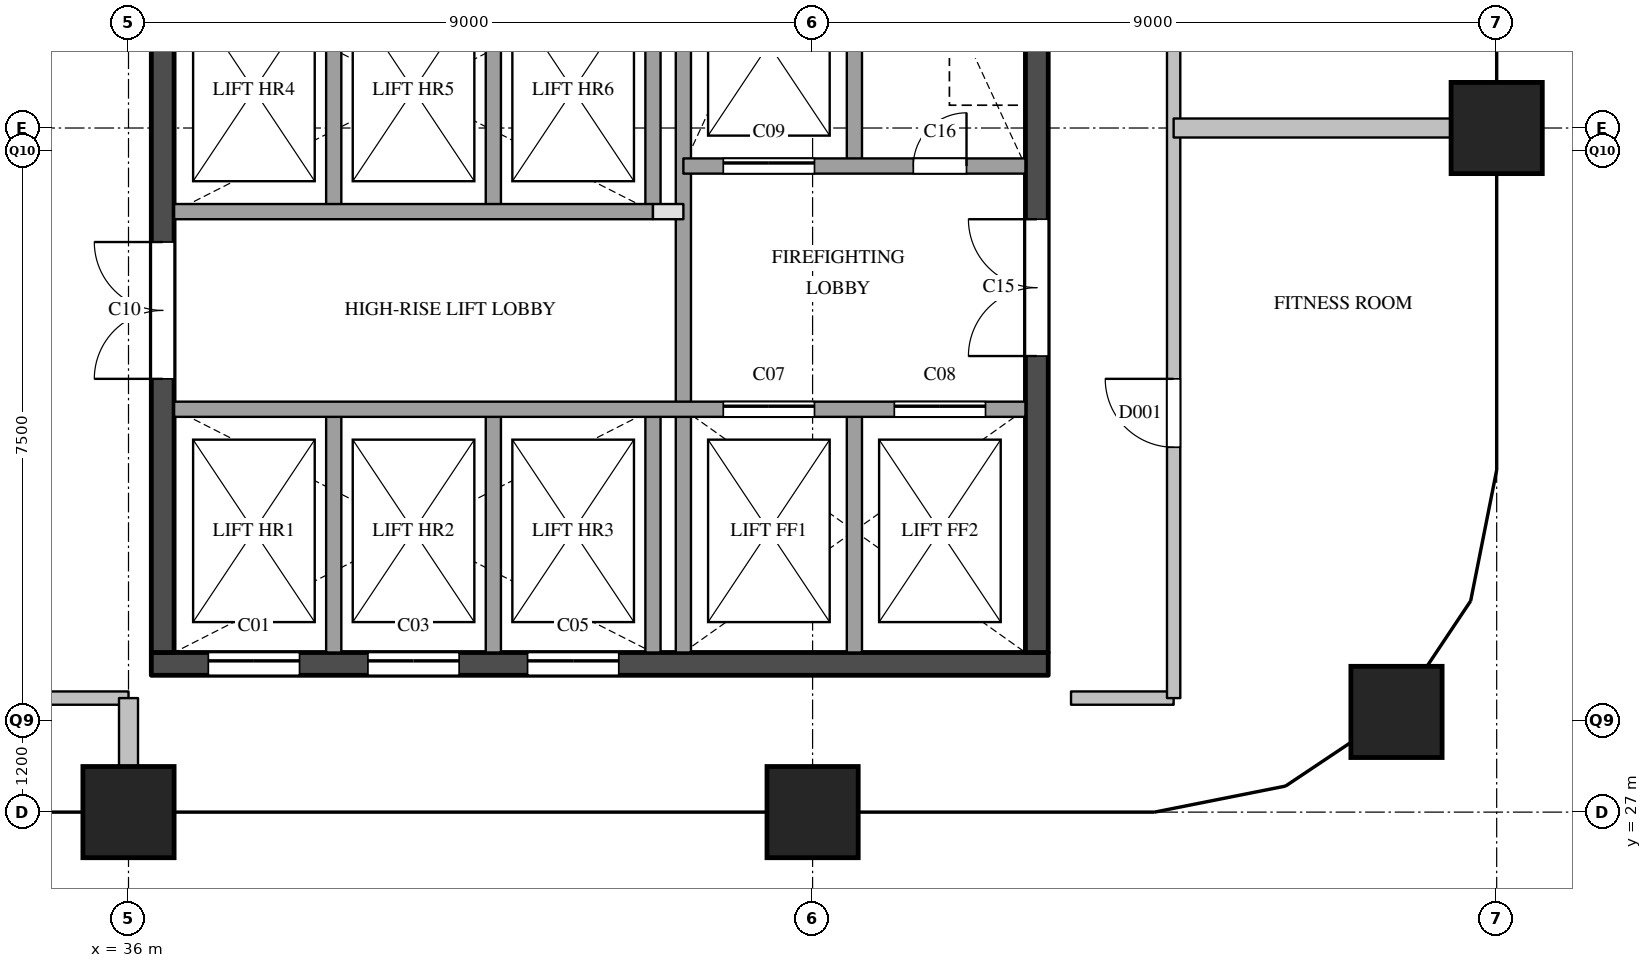
"""IFC4 building model, lengths in metres.
Left out: names, types, materials, properties, quantities, classifications, styles, units other than length and angle.
Written with IfcOpenShell. Run it as: python <this file> out.ifc"""

import sys

from ifc_helpers import new_model, si_unit, direction, frame, frame_2d, origin, origin_2d, place, context, subcontext, project, spatial, rectangle, extrude, element, fill, save


model = new_model("IFC4")
c1 = context("Model", 3, precision=1e-05, world=origin(), true_north=direction((0.0, 1.0)))
c2 = subcontext(c1, "Body", "Model", "MODEL_VIEW")
j1 = project(units=[si_unit("LENGTHUNIT", "METRE"), si_unit("PLANEANGLEUNIT", "RADIAN")], contexts=[c1])
p1 = place(None, origin())
s1 = spatial("IfcSite", under=j1, at=p1, CompositionType="ELEMENT")
p2 = place(p1, origin())
s2 = spatial("IfcBuilding", under=s1, at=p2, CompositionType="ELEMENT")
p3 = place(p2, frame((0.0, 0.0, 290.2)))
s3 = spatial("IfcBuildingStorey", under=s2, at=p3, CompositionType="ELEMENT", Elevation=290.2)
for number, where, z_axis, x_axis in (
    (1, (36.0, 27.0, 0.0), (0.0, 0.0, 1.0), (1.0, 0.0, 0.0)),
    (2, (45.0, 27.0, 0.0), (0.0, 0.0, 1.0), (1.0, 0.0, 0.0)),
    (3, (52.682, 28.318, 0.0), (0.0, 0.0, 1.0), (1.0, 0.0, 0.0)),
    (4, (54.0, 36.0, 0.0), (0.0, 0.0, 1.0), (1.0, 0.0, 0.0)),
):
    element("IfcColumn", number, at=place(p3, frame(where, z_axis=z_axis, x_axis=x_axis)), inside=s3, PredefinedType="COLUMN", context=c2, shape_type="SweptSolid", body=[
        extrude(rectangle(XDim=1.2, YDim=1.2, at=origin_2d()), origin(), (0.0, 0.0, 1.0), 5.0),
    ])
p4 = place(p3, frame((36.3, 28.95, 0.0), z_axis=(0.0, 0.0, 1.0), x_axis=(1.0, 0.0, 0.0)))
e5 = element("IfcWall", 5, at=p4, inside=s3, PredefinedType="SHEAR", context=c2, shape_type="SweptSolid", body=[
    extrude(rectangle(XDim=11.8, YDim=0.3, at=frame_2d((5.9, 0.0))), origin(), (0.0, 0.0, 1.0), 4.5),
])
p5 = place(p4, frame((0.75, 0.0, 0.0)))
e6 = element("IfcOpeningElement", 6, at=p5, cuts=e5, PredefinedType="OPENING", context=c2, shape_type="SweptSolid", body=[
    extrude(rectangle(XDim=1.2, YDim=2.1, at=frame_2d((0.6, 1.05))), frame((0.0, 0.16, 0.0), z_axis=(0.0, -1.0, 0.0), x_axis=(1.0, 0.0, 0.0)), (0.0, 0.0, 1.0), 0.32),
])
p6 = place(p4, frame((2.85, 0.0, 0.0)))
e7 = element("IfcOpeningElement", 7, at=p6, cuts=e5, PredefinedType="OPENING", context=c2, shape_type="SweptSolid", body=[
    extrude(rectangle(XDim=1.2, YDim=2.1, at=frame_2d((0.6, 1.05))), frame((0.0, 0.16, 0.0), z_axis=(0.0, -1.0, 0.0), x_axis=(1.0, 0.0, 0.0)), (0.0, 0.0, 1.0), 0.32),
])
p7 = place(p4, frame((4.95, 0.0, 0.0)))
e8 = element("IfcOpeningElement", 8, at=p7, cuts=e5, PredefinedType="OPENING", context=c2, shape_type="SweptSolid", body=[
    extrude(rectangle(XDim=1.2, YDim=2.1, at=frame_2d((0.6, 1.05))), frame((0.0, 0.16, 0.0), z_axis=(0.0, -1.0, 0.0), x_axis=(1.0, 0.0, 0.0)), (0.0, 0.0, 1.0), 0.32),
])
p8 = place(p3, frame((36.45, 29.1, 0.0), z_axis=(0.0, 0.0, 1.0), x_axis=(0.0, 1.0, 0.0)))
e9 = element("IfcWall", 9, at=p8, inside=s3, PredefinedType="SHEAR", context=c2, shape_type="SweptSolid", body=[
    extrude(rectangle(XDim=20.3, YDim=0.3, at=frame_2d((10.15, 0.0))), origin(), (0.0, 0.0, 1.0), 4.5),
])
p9 = place(p8, frame((3.6, 0.0, 0.0)))
e10 = element("IfcOpeningElement", 10, at=p9, cuts=e9, PredefinedType="OPENING", context=c2, shape_type="SweptSolid", body=[
    extrude(rectangle(XDim=1.8, YDim=2.1, at=frame_2d((0.9, 1.05))), frame((0.0, 0.16, 0.0), z_axis=(0.0, -1.0, 0.0), x_axis=(1.0, 0.0, 0.0)), (0.0, 0.0, 1.0), 0.32),
])
p10 = place(p8, frame((16.4, 0.0, 0.0)))
e11 = element("IfcOpeningElement", 11, at=p10, cuts=e9, PredefinedType="OPENING", context=c2, shape_type="SweptSolid", body=[
    extrude(rectangle(XDim=1.0, YDim=2.1, at=frame_2d((0.5, 1.05))), frame((0.0, 0.16, 0.0), z_axis=(0.0, -1.0, 0.0), x_axis=(1.0, 0.0, 0.0)), (0.0, 0.0, 1.0), 0.32),
])
p11 = place(p3, frame((47.95, 29.1, 0.0), z_axis=(0.0, 0.0, 1.0), x_axis=(0.0, 1.0, 0.0)))
e12 = element("IfcWall", 12, at=p11, inside=s3, PredefinedType="SHEAR", context=c2, shape_type="SweptSolid", body=[
    extrude(rectangle(XDim=20.3, YDim=0.3, at=frame_2d((10.15, 0.0))), origin(), (0.0, 0.0, 1.0), 4.5),
])
p12 = place(p11, frame((12.5, 0.0, 0.0)))
e13 = element("IfcOpeningElement", 13, at=p12, cuts=e12, PredefinedType="OPENING", context=c2, shape_type="SweptSolid", body=[
    extrude(rectangle(XDim=0.7, YDim=2.1, at=frame_2d((0.35, 1.05))), frame((0.0, 0.16, 0.0), z_axis=(0.0, -1.0, 0.0), x_axis=(1.0, 0.0, 0.0)), (0.0, 0.0, 1.0), 0.32),
])
p13 = place(p11, frame((3.9, 0.0, 0.0)))
e14 = element("IfcOpeningElement", 14, at=p13, cuts=e12, PredefinedType="OPENING", context=c2, shape_type="SweptSolid", body=[
    extrude(rectangle(XDim=1.8, YDim=2.1, at=frame_2d((0.9, 1.05))), frame((0.0, 0.16, 0.0), z_axis=(0.0, -1.0, 0.0), x_axis=(1.0, 0.0, 0.0)), (0.0, 0.0, 1.0), 0.32),
])
p14 = place(p3, frame((38.7, 29.1, 0.0), z_axis=(0.0, 0.0, 1.0), x_axis=(0.0, 1.0, 0.0)))
e15 = element("IfcWall", 15, at=p14, inside=s3, PredefinedType="SOLIDWALL", context=c2, shape_type="SweptSolid", body=[
    extrude(rectangle(XDim=3.2, YDim=0.2, at=frame_2d((1.6, 0.0))), origin(), (0.0, 0.0, 1.0), 4.5),
])
p15 = place(p3, frame((38.7, 34.9, 0.0), z_axis=(0.0, 0.0, 1.0), x_axis=(0.0, 1.0, 0.0)))
e16 = element("IfcWall", 16, at=p15, inside=s3, PredefinedType="SOLIDWALL", context=c2, shape_type="SweptSolid", body=[
    extrude(rectangle(XDim=3.2, YDim=0.2, at=frame_2d((1.6, 0.0))), origin(), (0.0, 0.0, 1.0), 4.5),
])
p16 = place(p3, frame((40.8, 29.1, 0.0), z_axis=(0.0, 0.0, 1.0), x_axis=(0.0, 1.0, 0.0)))
e17 = element("IfcWall", 17, at=p16, inside=s3, PredefinedType="SOLIDWALL", context=c2, shape_type="SweptSolid", body=[
    extrude(rectangle(XDim=3.2, YDim=0.2, at=frame_2d((1.6, 0.0))), origin(), (0.0, 0.0, 1.0), 4.5),
])
p17 = place(p3, frame((40.8, 34.9, 0.0), z_axis=(0.0, 0.0, 1.0), x_axis=(0.0, 1.0, 0.0)))
e18 = element("IfcWall", 18, at=p17, inside=s3, PredefinedType="SOLIDWALL", context=c2, shape_type="SweptSolid", body=[
    extrude(rectangle(XDim=3.2, YDim=0.2, at=frame_2d((1.6, 0.0))), origin(), (0.0, 0.0, 1.0), 4.5),
])
p18 = place(p3, frame((42.9, 29.1, 0.0), z_axis=(0.0, 0.0, 1.0), x_axis=(0.0, 1.0, 0.0)))
e19 = element("IfcWall", 19, at=p18, inside=s3, PredefinedType="SOLIDWALL", context=c2, shape_type="SweptSolid", body=[
    extrude(rectangle(XDim=3.2, YDim=0.2, at=frame_2d((1.6, 0.0))), origin(), (0.0, 0.0, 1.0), 4.5),
])
p19 = place(p3, frame((42.9, 34.9, 0.0), z_axis=(0.0, 0.0, 1.0), x_axis=(0.0, 1.0, 0.0)))
e20 = element("IfcWall", 20, at=p19, inside=s3, PredefinedType="SOLIDWALL", context=c2, shape_type="SweptSolid", body=[
    extrude(rectangle(XDim=3.2, YDim=0.2, at=frame_2d((1.6, 0.0))), origin(), (0.0, 0.0, 1.0), 4.5),
])
p20 = place(p3, frame((43.3, 29.1, 0.0), z_axis=(0.0, 0.0, 1.0), x_axis=(0.0, 1.0, 0.0)))
e21 = element("IfcWall", 21, at=p20, inside=s3, PredefinedType="SOLIDWALL", context=c2, shape_type="SweptSolid", body=[
    extrude(rectangle(XDim=9.9, YDim=0.2, at=frame_2d((4.95, 0.0))), origin(), (0.0, 0.0, 1.0), 4.5),
])
for number, where, z_axis, x_axis in (
    (22, (45.55, 29.1, 0.0), (0.0, 0.0, 1.0), (0.0, 1.0, 0.0)),
    (23, (45.55, 35.5, 0.0), (0.0, 0.0, 1.0), (0.0, 1.0, 0.0)),
):
    element("IfcWall", number, at=place(p3, frame(where, z_axis=z_axis, x_axis=x_axis)), inside=s3, PredefinedType="SOLIDWALL", context=c2, shape_type="SweptSolid", body=[
        extrude(rectangle(XDim=3.2, YDim=0.2, at=frame_2d((1.6, 0.0))), origin(), (0.0, 0.0, 1.0), 4.5),
    ])
p21 = place(p3, frame((36.6, 32.3, 0.0), z_axis=(0.0, 0.0, 1.0), x_axis=(1.0, 0.0, 0.0)))
e24 = element("IfcWall", 24, at=p21, inside=s3, PredefinedType="SOLIDWALL", context=c2, shape_type="SweptSolid", body=[
    extrude(rectangle(XDim=11.2, YDim=0.2, at=frame_2d((5.6, 0.0))), origin(), (0.0, 0.0, 1.0), 4.5),
])
p22 = place(p21, frame((7.225, 0.0, 0.0)))
e25 = element("IfcOpeningElement", 25, at=p22, cuts=e24, PredefinedType="OPENING", context=c2, shape_type="SweptSolid", body=[
    extrude(rectangle(XDim=1.2, YDim=2.1, at=frame_2d((0.6, 1.05))), frame((0.0, 0.11, 0.0), z_axis=(0.0, -1.0, 0.0), x_axis=(1.0, 0.0, 0.0)), (0.0, 0.0, 1.0), 0.22),
])
p23 = place(p21, frame((9.475, 0.0, 0.0)))
e26 = element("IfcOpeningElement", 26, at=p23, cuts=e24, PredefinedType="OPENING", context=c2, shape_type="SweptSolid", body=[
    extrude(rectangle(XDim=1.2, YDim=2.1, at=frame_2d((0.6, 1.05))), frame((0.0, 0.11, 0.0), z_axis=(0.0, -1.0, 0.0), x_axis=(1.0, 0.0, 0.0)), (0.0, 0.0, 1.0), 0.22),
])
p24 = place(p3, frame((42.9, 34.9, 0.0), z_axis=(0.0, 0.0, 1.0), x_axis=(1.0, 0.0, 0.0)))
e27 = element("IfcWall", 27, at=p24, inside=s3, PredefinedType="PARTITIONING", context=c2, shape_type="SweptSolid", body=[
    extrude(rectangle(XDim=0.4, YDim=0.2, at=frame_2d((0.2, 0.0))), origin(), (0.0, 0.0, 1.0), 4.5),
])
p25 = place(p3, frame((36.6, 34.9, 0.0), z_axis=(0.0, 0.0, 1.0), x_axis=(1.0, 0.0, 0.0)))
e28 = element("IfcWall", 28, at=p25, inside=s3, PredefinedType="SOLIDWALL", context=c2, shape_type="SweptSolid", body=[
    extrude(rectangle(XDim=6.3, YDim=0.2, at=frame_2d((3.15, 0.0))), origin(), (0.0, 0.0, 1.0), 4.5),
])
p26 = place(p3, frame((43.3, 35.5, 0.0), z_axis=(0.0, 0.0, 1.0), x_axis=(1.0, 0.0, 0.0)))
e29 = element("IfcWall", 29, at=p26, inside=s3, PredefinedType="SOLIDWALL", context=c2, shape_type="SweptSolid", body=[
    extrude(rectangle(XDim=4.5, YDim=0.2, at=frame_2d((2.25, 0.0))), origin(), (0.0, 0.0, 1.0), 4.5),
])
p27 = place(p26, frame((0.525, 0.0, 0.0)))
e30 = element("IfcOpeningElement", 30, at=p27, cuts=e29, PredefinedType="OPENING", context=c2, shape_type="SweptSolid", body=[
    extrude(rectangle(XDim=1.2, YDim=2.1, at=frame_2d((0.6, 1.05))), frame((0.0, 0.11, 0.0), z_axis=(0.0, -1.0, 0.0), x_axis=(1.0, 0.0, 0.0)), (0.0, 0.0, 1.0), 0.22),
])
p28 = place(p26, frame((3.025, 0.0, 0.0)))
e31 = element("IfcOpeningElement", 31, at=p28, cuts=e29, PredefinedType="OPENING", context=c2, shape_type="SweptSolid", body=[
    extrude(rectangle(XDim=0.7, YDim=2.1, at=frame_2d((0.35, 1.05))), frame((0.0, 0.11, 0.0), z_axis=(0.0, -1.0, 0.0), x_axis=(1.0, 0.0, 0.0)), (0.0, 0.0, 1.0), 0.22),
])
for number, where, z_axis, x_axis in (
    (32, (34.65, 28.5, 0.0), (0.0, 0.0, 1.0), (1.0, 0.0, 0.0)),
    (33, (48.4, 28.5, 0.0), (0.0, 0.0, 1.0), (1.0, 0.0, 0.0)),
):
    element("IfcWall", number, at=place(p3, frame(where, z_axis=z_axis, x_axis=x_axis)), inside=s3, PredefinedType="PARTITIONING", context=c2, shape_type="SweptSolid", body=[
        extrude(rectangle(XDim=1.35, YDim=0.175, at=frame_2d((0.675, 0.0))), origin(), (0.0, 0.0, 1.0), 4.5),
    ])
p29 = place(p3, frame((49.75, 28.5, 0.0), z_axis=(0.0, 0.0, 1.0), x_axis=(0.0, 1.0, 0.0)))
e34 = element("IfcWall", 34, at=p29, inside=s3, PredefinedType="PARTITIONING", context=c2, shape_type="SweptSolid", body=[
    extrude(rectangle(XDim=22.85, YDim=0.175, at=frame_2d((11.425, 0.0))), origin(), (0.0, 0.0, 1.0), 4.5),
])
p30 = place(p29, frame((3.3, 0.0, 0.0)))
e35 = element("IfcOpeningElement", 35, at=p30, cuts=e34, PredefinedType="OPENING", context=c2, shape_type="SweptSolid", body=[
    extrude(rectangle(XDim=0.9, YDim=2.1, at=frame_2d((0.45, 1.05))), frame((0.0, 0.097, 0.0), z_axis=(0.0, -1.0, 0.0), x_axis=(1.0, 0.0, 0.0)), (0.0, 0.0, 1.0), 0.195),
])
p31 = place(p29, frame((12.45, 0.0, 0.0)))
e36 = element("IfcOpeningElement", 36, at=p31, cuts=e34, PredefinedType="OPENING", context=c2, shape_type="SweptSolid", body=[
    extrude(rectangle(XDim=0.9, YDim=2.1, at=frame_2d((0.45, 1.05))), frame((0.0, 0.097, 0.0), z_axis=(0.0, -1.0, 0.0), x_axis=(1.0, 0.0, 0.0)), (0.0, 0.0, 1.0), 0.195),
])
p32 = place(p29, frame((20.125, 0.0, 0.0)))
e37 = element("IfcOpeningElement", 37, at=p32, cuts=e34, PredefinedType="OPENING", context=c2, shape_type="SweptSolid", body=[
    extrude(rectangle(XDim=0.9, YDim=2.1, at=frame_2d((0.45, 1.05))), frame((0.0, 0.097, 0.0), z_axis=(0.0, -1.0, 0.0), x_axis=(1.0, 0.0, 0.0)), (0.0, 0.0, 1.0), 0.195),
])
p33 = place(p3, frame((49.75, 36.0, 0.0), z_axis=(0.0, 0.0, 1.0), x_axis=(1.0, 0.0, 0.0)))
e38 = element("IfcWall", 38, at=p33, inside=s3, PredefinedType="PARTITIONING", context=c2, shape_type="SweptSolid", body=[
    extrude(rectangle(XDim=4.25, YDim=0.25, at=frame_2d((2.125, 0.0))), origin(), (0.0, 0.0, 1.0), 4.5),
])
p34 = place(p3, frame((36.0, 27.0, 0.0), z_axis=(0.0, 0.0, 1.0), x_axis=(0.0, 1.0, 0.0)))
e39 = element("IfcWall", 39, at=p34, inside=s3, PredefinedType="PARTITIONING", context=c2, shape_type="SweptSolid", body=[
    extrude(rectangle(XDim=1.5, YDim=0.25, at=frame_2d((0.75, 0.0))), origin(), (0.0, 0.0, 1.0), 4.5),
])
p35 = place(p5, origin())
e40 = element("IfcDoor", 40, at=p35, inside=s3, OperationType="SLIDING_TO_LEFT", PredefinedType="DOOR", context=c2, shape_type="SweptSolid", body=[
    extrude(rectangle(XDim=1.2, YDim=2.1, at=frame_2d((0.6, 1.05))), frame((0.0, 0.025, 0.0), z_axis=(0.0, -1.0, 0.0), x_axis=(1.0, 0.0, 0.0)), (0.0, 0.0, 1.0), 0.05),
])
fill(e6, e40)
p36 = place(p6, origin())
e41 = element("IfcDoor", 41, at=p36, inside=s3, OperationType="SLIDING_TO_LEFT", PredefinedType="DOOR", context=c2, shape_type="SweptSolid", body=[
    extrude(rectangle(XDim=1.2, YDim=2.1, at=frame_2d((0.6, 1.05))), frame((0.0, 0.025, 0.0), z_axis=(0.0, -1.0, 0.0), x_axis=(1.0, 0.0, 0.0)), (0.0, 0.0, 1.0), 0.05),
])
fill(e7, e41)
p37 = place(p7, origin())
e42 = element("IfcDoor", 42, at=p37, inside=s3, OperationType="SLIDING_TO_LEFT", PredefinedType="DOOR", context=c2, shape_type="SweptSolid", body=[
    extrude(rectangle(XDim=1.2, YDim=2.1, at=frame_2d((0.6, 1.05))), frame((0.0, 0.025, 0.0), z_axis=(0.0, -1.0, 0.0), x_axis=(1.0, 0.0, 0.0)), (0.0, 0.0, 1.0), 0.05),
])
fill(e8, e42)
p38 = place(p22, origin())
e43 = element("IfcDoor", 43, at=p38, inside=s3, OperationType="SLIDING_TO_LEFT", PredefinedType="DOOR", context=c2, shape_type="SweptSolid", body=[
    extrude(rectangle(XDim=1.2, YDim=2.1, at=frame_2d((0.6, 1.05))), frame((0.0, 0.025, 0.0), z_axis=(0.0, -1.0, 0.0), x_axis=(1.0, 0.0, 0.0)), (0.0, 0.0, 1.0), 0.05),
])
fill(e25, e43)
p39 = place(p23, origin())
e44 = element("IfcDoor", 44, at=p39, inside=s3, OperationType="SLIDING_TO_LEFT", PredefinedType="DOOR", context=c2, shape_type="SweptSolid", body=[
    extrude(rectangle(XDim=1.2, YDim=2.1, at=frame_2d((0.6, 1.05))), frame((0.0, 0.025, 0.0), z_axis=(0.0, -1.0, 0.0), x_axis=(1.0, 0.0, 0.0)), (0.0, 0.0, 1.0), 0.05),
])
fill(e26, e44)
p40 = place(p27, origin())
e45 = element("IfcDoor", 45, at=p40, inside=s3, OperationType="SLIDING_TO_LEFT", PredefinedType="DOOR", context=c2, shape_type="SweptSolid", body=[
    extrude(rectangle(XDim=1.2, YDim=2.1, at=frame_2d((0.6, 1.05))), frame((0.0, 0.025, 0.0), z_axis=(0.0, -1.0, 0.0), x_axis=(1.0, 0.0, 0.0)), (0.0, 0.0, 1.0), 0.05),
])
fill(e30, e45)
p41 = place(p9, origin())
e46 = element("IfcDoor", 46, at=p41, inside=s3, OperationType="DOUBLE_DOOR_SINGLE_SWING", PredefinedType="DOOR", context=c2, shape_type="SweptSolid", body=[
    extrude(rectangle(XDim=1.8, YDim=2.1, at=frame_2d((0.9, 1.05))), frame((0.0, 0.025, 0.0), z_axis=(0.0, -1.0, 0.0), x_axis=(1.0, 0.0, 0.0)), (0.0, 0.0, 1.0), 0.05),
])
fill(e10, e46)
p42 = place(p13, origin())
e47 = element("IfcDoor", 47, at=p42, inside=s3, OperationType="DOUBLE_DOOR_SINGLE_SWING", PredefinedType="DOOR", context=c2, shape_type="SweptSolid", body=[
    extrude(rectangle(XDim=1.8, YDim=2.1, at=frame_2d((0.9, 1.05))), frame((0.0, 0.025, 0.0), z_axis=(0.0, -1.0, 0.0), x_axis=(1.0, 0.0, 0.0)), (0.0, 0.0, 1.0), 0.05),
])
fill(e14, e47)
p43 = place(p28, origin())
e48 = element("IfcDoor", 48, at=p43, inside=s3, OperationType="SINGLE_SWING_RIGHT", PredefinedType="DOOR", context=c2, shape_type="SweptSolid", body=[
    extrude(rectangle(XDim=0.7, YDim=2.1, at=frame_2d((0.35, 1.05))), frame((0.0, 0.025, 0.0), z_axis=(0.0, -1.0, 0.0), x_axis=(1.0, 0.0, 0.0)), (0.0, 0.0, 1.0), 0.05),
])
fill(e31, e48)
p44 = place(p30, origin())
e49 = element("IfcDoor", 49, at=p44, inside=s3, OperationType="SINGLE_SWING_RIGHT", PredefinedType="DOOR", context=c2, shape_type="SweptSolid", body=[
    extrude(rectangle(XDim=0.9, YDim=2.1, at=frame_2d((0.45, 1.05))), frame((0.0, 0.025, 0.0), z_axis=(0.0, -1.0, 0.0), x_axis=(1.0, 0.0, 0.0)), (0.0, 0.0, 1.0), 0.05),
])
fill(e35, e49)
save(model, sys.argv[1])
